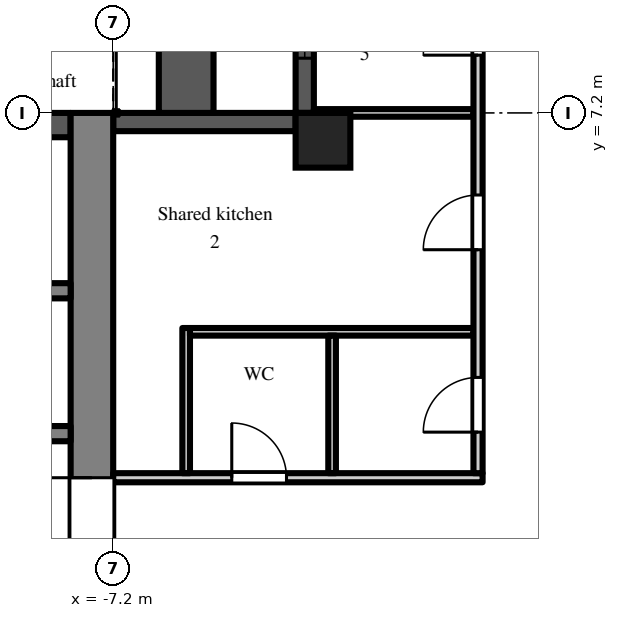
"""IFC4 building model, lengths in metres.
Left out: names, types, materials, properties, quantities, classifications, styles, units other than length and angle.
Written with IfcOpenShell. Run it as: python <this file> out.ifc"""

import sys

from ifc_helpers import new_model, si_unit, direction, frame, frame_2d, origin, origin_2d, place, context, subcontext, project, spatial, rectangle, extrude, element, fill, save


model = new_model("IFC4")
c1 = context("Model", 3, precision=1e-05, world=origin(), true_north=direction((0.0, 1.0)))
c2 = subcontext(c1, "Body", "Model", "MODEL_VIEW")
j1 = project(units=[si_unit("LENGTHUNIT", "METRE"), si_unit("PLANEANGLEUNIT", "RADIAN")], contexts=[c1])
p1 = place(None, origin())
s1 = spatial("IfcSite", under=j1, at=p1, CompositionType="ELEMENT")
p2 = place(p1, origin())
s2 = spatial("IfcBuilding", under=s1, at=p2, CompositionType="ELEMENT")
p3 = place(p2, frame((0.0, 0.0, 231.9)))
s3 = spatial("IfcBuildingStorey", under=s2, at=p3, CompositionType="ELEMENT", Elevation=231.9)
p4 = place(p3, frame((-3.75, 6.75, 0.0), z_axis=(0.0, 0.0, 1.0), x_axis=(1.0, 0.0, 0.0)))
e1 = element("IfcColumn", 1, at=p4, inside=s3, PredefinedType="COLUMN", context=c2, shape_type="SweptSolid", body=[
    extrude(rectangle(XDim=0.9, YDim=0.9, at=origin_2d()), origin(), (0.0, 0.0, 1.0), 3.0),
])
p5 = place(p3, frame((-4.05, 14.4, 0.0), z_axis=(0.0, 0.0, 1.0), x_axis=(0.0, -1.0, 0.0)))
e2 = element("IfcWall", 2, at=p5, inside=s3, PredefinedType="SOLIDWALL", context=c2, shape_type="SweptSolid", body=[
    extrude(rectangle(XDim=7.2, YDim=0.3, at=frame_2d((3.6, 0.0))), origin(), (0.0, 0.0, 1.0), 2.3),
])
p6 = place(p5, frame((3.0, 0.0, 0.0)))
e3 = element("IfcOpeningElement", 3, at=p6, cuts=e2, PredefinedType="OPENING", context=c2, shape_type="SweptSolid", body=[
    extrude(rectangle(XDim=1.2, YDim=2.05, at=frame_2d((0.6, 1.025))), frame((0.0, 0.16, 0.0), z_axis=(0.0, -1.0, 0.0), x_axis=(1.0, 0.0, 0.0)), (0.0, 0.0, 1.0), 0.32),
])
p7 = place(p5, frame((0.9, 0.0, 0.2)))
e4 = element("IfcOpeningElement", 4, at=p7, cuts=e2, PredefinedType="OPENING", context=c2, shape_type="SweptSolid", body=[
    extrude(rectangle(XDim=1.8, YDim=1.85, at=frame_2d((0.9, 0.925))), frame((0.0, 0.16, 0.0), z_axis=(0.0, -1.0, 0.0), x_axis=(1.0, 0.0, 0.0)), (0.0, 0.0, 1.0), 0.32),
])
p8 = place(p5, frame((4.5, 0.0, 0.2)))
e5 = element("IfcOpeningElement", 5, at=p8, cuts=e2, PredefinedType="OPENING", context=c2, shape_type="SweptSolid", body=[
    extrude(rectangle(XDim=1.8, YDim=1.85, at=frame_2d((0.9, 0.925))), frame((0.0, 0.16, 0.0), z_axis=(0.0, -1.0, 0.0), x_axis=(1.0, 0.0, 0.0)), (0.0, 0.0, 1.0), 0.32),
])
p9 = place(p3, frame((-4.2, 7.05, 0.0), z_axis=(0.0, 0.0, 1.0), x_axis=(-1.0, 0.0, 0.0)))
e6 = element("IfcWall", 6, at=p9, inside=s3, PredefinedType="SOLIDWALL", context=c2, shape_type="SweptSolid", body=[
    extrude(rectangle(XDim=3.0, YDim=0.3, at=frame_2d((1.5, 0.0))), origin(), (0.0, 0.0, 1.0), 2.3),
])
p10 = place(p3, frame((-6.0, 7.2, 0.0), z_axis=(0.0, 0.0, 1.0), x_axis=(0.0, 1.0, 0.0)))
e7 = element("IfcWall", 7, at=p10, inside=s3, PredefinedType="PARAPET", context=c2, shape_type="SweptSolid", body=[
    extrude(rectangle(XDim=7.2, YDim=0.9, at=frame_2d((3.6, 0.0))), origin(), (0.0, 0.0, 1.0), 0.8),
])
p11 = place(p3, frame((-7.55, -7.2, 0.0), z_axis=(0.0, 0.0, 1.0), x_axis=(0.0, 1.0, 0.0)))
e8 = element("IfcWall", 8, at=p11, inside=s3, PredefinedType="SHEAR", context=c2, shape_type="SweptSolid", body=[
    extrude(rectangle(XDim=14.4, YDim=0.7, at=frame_2d((7.2, 0.0))), origin(), (0.0, 0.0, 1.0), 2.6),
])
p12 = place(p11, frame((6.0, 0.0, 0.0)))
e9 = element("IfcOpeningElement", 9, at=p12, cuts=e8, PredefinedType="OPENING", context=c2, shape_type="SweptSolid", body=[
    extrude(rectangle(XDim=2.4, YDim=2.2, at=frame_2d((1.2, 1.1))), frame((0.0, 0.36, 0.0), z_axis=(0.0, -1.0, 0.0), x_axis=(1.0, 0.0, 0.0)), (0.0, 0.0, 1.0), 0.72),
])
p13 = place(p3, frame((-7.9, 7.0, 0.0), z_axis=(0.0, 0.0, 1.0), x_axis=(-1.0, 0.0, 0.0)))
e10 = element("IfcWall", 10, at=p13, inside=s3, PredefinedType="SHEAR", context=c2, shape_type="SweptSolid", body=[
    extrude(rectangle(XDim=12.95, YDim=0.4, at=frame_2d((6.475, 0.0))), origin(), (0.0, 0.0, 1.0), 2.6),
])
p14 = place(p3, frame((-7.9, 1.925, 0.0), z_axis=(0.0, 0.0, 1.0), x_axis=(-1.0, 0.0, 0.0)))
e11 = element("IfcWall", 11, at=p14, inside=s3, PredefinedType="SHEAR", context=c2, shape_type="SweptSolid", body=[
    extrude(rectangle(XDim=12.95, YDim=0.25, at=frame_2d((6.475, 0.0))), origin(), (0.0, 0.0, 1.0), 2.6),
])
p15 = place(p14, frame((4.825, 0.0, 0.0)))
e12 = element("IfcOpeningElement", 12, at=p15, cuts=e11, PredefinedType="OPENING", context=c2, shape_type="SweptSolid", body=[
    extrude(rectangle(XDim=1.1, YDim=2.1, at=frame_2d((0.55, 1.05))), frame((0.0, 0.135, 0.0), z_axis=(0.0, -1.0, 0.0), x_axis=(1.0, 0.0, 0.0)), (0.0, 0.0, 1.0), 0.27),
])
p16 = place(p14, frame((7.025, 0.0, 0.0)))
e13 = element("IfcOpeningElement", 13, at=p16, cuts=e11, PredefinedType="OPENING", context=c2, shape_type="SweptSolid", body=[
    extrude(rectangle(XDim=1.1, YDim=2.1, at=frame_2d((0.55, 1.05))), frame((0.0, 0.135, 0.0), z_axis=(0.0, -1.0, 0.0), x_axis=(1.0, 0.0, 0.0)), (0.0, 0.0, 1.0), 0.27),
])
p17 = place(p14, frame((9.225, 0.0, 0.0)))
e14 = element("IfcOpeningElement", 14, at=p17, cuts=e11, PredefinedType="OPENING", context=c2, shape_type="SweptSolid", body=[
    extrude(rectangle(XDim=1.1, YDim=2.1, at=frame_2d((0.55, 1.05))), frame((0.0, 0.135, 0.0), z_axis=(0.0, -1.0, 0.0), x_axis=(1.0, 0.0, 0.0)), (0.0, 0.0, 1.0), 0.27),
])
p18 = place(p14, frame((0.525, 0.0, 0.0)))
e15 = element("IfcOpeningElement", 15, at=p18, cuts=e11, PredefinedType="OPENING", context=c2, shape_type="SweptSolid", body=[
    extrude(rectangle(XDim=0.9, YDim=2.1, at=frame_2d((0.45, 1.05))), frame((0.0, 0.135, 0.0), z_axis=(0.0, -1.0, 0.0), x_axis=(1.0, 0.0, 0.0)), (0.0, 0.0, 1.0), 0.27),
])
p19 = place(p14, frame((2.625, 0.0, 0.0)))
e16 = element("IfcOpeningElement", 16, at=p19, cuts=e11, PredefinedType="OPENING", context=c2, shape_type="SweptSolid", body=[
    extrude(rectangle(XDim=1.1, YDim=2.1, at=frame_2d((0.55, 1.05))), frame((0.0, 0.135, 0.0), z_axis=(0.0, -1.0, 0.0), x_axis=(1.0, 0.0, 0.0)), (0.0, 0.0, 1.0), 0.27),
])
p20 = place(p14, frame((11.525, 0.0, 0.0)))
e17 = element("IfcOpeningElement", 17, at=p20, cuts=e11, PredefinedType="OPENING", context=c2, shape_type="SweptSolid", body=[
    extrude(rectangle(XDim=0.9, YDim=2.1, at=frame_2d((0.45, 1.05))), frame((0.0, 0.135, 0.0), z_axis=(0.0, -1.0, 0.0), x_axis=(1.0, 0.0, 0.0)), (0.0, 0.0, 1.0), 0.27),
])
p21 = place(p3, frame((-7.9, 4.275, 0.0), z_axis=(0.0, 0.0, 1.0), x_axis=(-1.0, 0.0, 0.0)))
e18 = element("IfcWall", 18, at=p21, inside=s3, PredefinedType="SHEAR", context=c2, shape_type="SweptSolid", body=[
    extrude(rectangle(XDim=1.95, YDim=0.25, at=frame_2d((0.975, 0.0))), origin(), (0.0, 0.0, 1.0), 2.6),
])
p22 = place(p3, frame((-7.2, 1.2, 0.0), z_axis=(0.0, 0.0, 1.0), x_axis=(1.0, 0.0, 0.0)))
e19 = element("IfcWall", 19, at=p22, inside=s3, PredefinedType="PARTITIONING", context=c2, shape_type="SweptSolid", body=[
    extrude(rectangle(XDim=6.075, YDim=0.15, at=frame_2d((3.038, 0.0))), origin(), (0.0, 0.0, 1.0), 2.6),
])
p23 = place(p22, frame((1.95, 0.0, 0.0)))
e20 = element("IfcOpeningElement", 20, at=p23, cuts=e19, PredefinedType="OPENING", context=c2, shape_type="SweptSolid", body=[
    extrude(rectangle(XDim=0.9, YDim=2.1, at=frame_2d((0.45, 1.05))), frame((0.0, 0.085, 0.0), z_axis=(0.0, -1.0, 0.0), x_axis=(1.0, 0.0, 0.0)), (0.0, 0.0, 1.0), 0.17),
])
p24 = place(p3, frame((-6.0, 1.275, 0.0), z_axis=(0.0, 0.0, 1.0), x_axis=(0.0, 1.0, 0.0)))
e21 = element("IfcWall", 21, at=p24, inside=s3, PredefinedType="PARTITIONING", context=c2, shape_type="SweptSolid", body=[
    extrude(rectangle(XDim=2.388, YDim=0.125, at=frame_2d((1.194, 0.0))), origin(), (0.0, 0.0, 1.0), 2.6),
])
p25 = place(p3, frame((-5.938, 3.6, 0.0), z_axis=(0.0, 0.0, 1.0), x_axis=(1.0, 0.0, 0.0)))
e22 = element("IfcWall", 22, at=p25, inside=s3, PredefinedType="PARTITIONING", context=c2, shape_type="SweptSolid", body=[
    extrude(rectangle(XDim=4.663, YDim=0.125, at=frame_2d((2.331, 0.0))), origin(), (0.0, 0.0, 1.0), 2.6),
])
p26 = place(p3, frame((-3.9, 7.2, 0.0), z_axis=(0.0, 0.0, 1.0), x_axis=(1.0, 0.0, 0.0)))
e23 = element("IfcWall", 23, at=p26, inside=s3, PredefinedType="PARTITIONING", context=c2, shape_type="SweptSolid", body=[
    extrude(rectangle(XDim=2.625, YDim=0.125, at=frame_2d((1.312, 0.0))), origin(), (0.0, 0.0, 1.0), 2.6),
])
p27 = place(p3, frame((-3.6, 1.275, 0.0), z_axis=(0.0, 0.0, 1.0), x_axis=(0.0, 1.0, 0.0)))
e24 = element("IfcWall", 24, at=p27, inside=s3, PredefinedType="PARTITIONING", context=c2, shape_type="SweptSolid", body=[
    extrude(rectangle(XDim=2.263, YDim=0.125, at=frame_2d((1.131, 0.0))), origin(), (0.0, 0.0, 1.0), 2.6),
])
p28 = place(p3, frame((-1.2, 1.275, 0.0), z_axis=(0.0, 0.0, 1.0), x_axis=(0.0, 1.0, 0.0)))
e25 = element("IfcWall", 25, at=p28, inside=s3, PredefinedType="PARTITIONING", context=c2, shape_type="SweptSolid", body=[
    extrude(rectangle(XDim=18.25, YDim=0.15, at=frame_2d((9.125, 0.0))), origin(), (0.0, 0.0, 1.0), 2.6),
])
p29 = place(p28, frame((0.675, 0.0, 0.0)))
e26 = element("IfcOpeningElement", 26, at=p29, cuts=e25, PredefinedType="OPENING", context=c2, shape_type="SweptSolid", body=[
    extrude(rectangle(XDim=0.9, YDim=2.1, at=frame_2d((0.45, 1.05))), frame((0.0, 0.085, 0.0), z_axis=(0.0, -1.0, 0.0), x_axis=(1.0, 0.0, 0.0)), (0.0, 0.0, 1.0), 0.17),
])
p30 = place(p28, frame((3.675, 0.0, 0.0)))
e27 = element("IfcOpeningElement", 27, at=p30, cuts=e25, PredefinedType="OPENING", context=c2, shape_type="SweptSolid", body=[
    extrude(rectangle(XDim=0.9, YDim=2.1, at=frame_2d((0.45, 1.05))), frame((0.0, 0.085, 0.0), z_axis=(0.0, -1.0, 0.0), x_axis=(1.0, 0.0, 0.0)), (0.0, 0.0, 1.0), 0.17),
])
p31 = place(p28, frame((6.875, 0.0, 0.0)))
e28 = element("IfcOpeningElement", 28, at=p31, cuts=e25, PredefinedType="OPENING", context=c2, shape_type="SweptSolid", body=[
    extrude(rectangle(XDim=0.9, YDim=2.1, at=frame_2d((0.45, 1.05))), frame((0.0, 0.085, 0.0), z_axis=(0.0, -1.0, 0.0), x_axis=(1.0, 0.0, 0.0)), (0.0, 0.0, 1.0), 0.17),
])
p32 = place(p28, frame((10.475, 0.0, 0.0)))
e29 = element("IfcOpeningElement", 29, at=p32, cuts=e25, PredefinedType="OPENING", context=c2, shape_type="SweptSolid", body=[
    extrude(rectangle(XDim=0.9, YDim=2.1, at=frame_2d((0.45, 1.05))), frame((0.0, 0.085, 0.0), z_axis=(0.0, -1.0, 0.0), x_axis=(1.0, 0.0, 0.0)), (0.0, 0.0, 1.0), 0.17),
])
p33 = place(p28, frame((13.725, 0.0, 0.0)))
e30 = element("IfcOpeningElement", 30, at=p33, cuts=e25, PredefinedType="OPENING", context=c2, shape_type="SweptSolid", body=[
    extrude(rectangle(XDim=1.0, YDim=2.1, at=frame_2d((0.5, 1.05))), frame((0.0, 0.085, 0.0), z_axis=(0.0, -1.0, 0.0), x_axis=(1.0, 0.0, 0.0)), (0.0, 0.0, 1.0), 0.17),
])
p34 = place(p8, origin())
e31 = element("IfcWindow", 31, at=p34, inside=s3, PartitioningType="SINGLE_PANEL", PredefinedType="WINDOW", context=c2, shape_type="SweptSolid", body=[
    extrude(rectangle(XDim=1.8, YDim=1.85, at=frame_2d((0.9, 0.925))), frame((0.0, 0.03, 0.0), z_axis=(0.0, -1.0, 0.0), x_axis=(1.0, 0.0, 0.0)), (0.0, 0.0, 1.0), 0.06),
])
fill(e5, e31)
p35 = place(p12, origin())
e32 = element("IfcDoor", 32, at=p35, inside=s3, OperationType="DOUBLE_DOOR_DOUBLE_SWING", PredefinedType="DOOR", context=c2, shape_type="SweptSolid", body=[
    extrude(rectangle(XDim=2.4, YDim=2.2, at=frame_2d((1.2, 1.1))), frame((0.0, 0.025, 0.0), z_axis=(0.0, -1.0, 0.0), x_axis=(1.0, 0.0, 0.0)), (0.0, 0.0, 1.0), 0.05),
])
fill(e9, e32)
p36 = place(p29, origin())
e33 = element("IfcDoor", 33, at=p36, inside=s3, OperationType="SINGLE_SWING_LEFT", PredefinedType="DOOR", context=c2, shape_type="SweptSolid", body=[
    extrude(rectangle(XDim=0.9, YDim=2.1, at=frame_2d((0.45, 1.05))), frame((0.0, 0.025, 0.0), z_axis=(0.0, -1.0, 0.0), x_axis=(1.0, 0.0, 0.0)), (0.0, 0.0, 1.0), 0.05),
])
fill(e26, e33)
p37 = place(p23, origin())
e34 = element("IfcDoor", 34, at=p37, inside=s3, OperationType="SINGLE_SWING_LEFT", PredefinedType="DOOR", context=c2, shape_type="SweptSolid", body=[
    extrude(rectangle(XDim=0.9, YDim=2.1, at=frame_2d((0.45, 1.05))), frame((0.0, 0.025, 0.0), z_axis=(0.0, -1.0, 0.0), x_axis=(1.0, 0.0, 0.0)), (0.0, 0.0, 1.0), 0.05),
])
fill(e20, e34)
p38 = place(p30, origin())
e35 = element("IfcDoor", 35, at=p38, inside=s3, OperationType="SINGLE_SWING_LEFT", PredefinedType="DOOR", context=c2, shape_type="SweptSolid", body=[
    extrude(rectangle(XDim=0.9, YDim=2.1, at=frame_2d((0.45, 1.05))), frame((0.0, 0.025, 0.0), z_axis=(0.0, -1.0, 0.0), x_axis=(1.0, 0.0, 0.0)), (0.0, 0.0, 1.0), 0.05),
])
fill(e27, e35)
p39 = place(p31, origin())
e36 = element("IfcDoor", 36, at=p39, inside=s3, OperationType="SINGLE_SWING_LEFT", PredefinedType="DOOR", context=c2, shape_type="SweptSolid", body=[
    extrude(rectangle(XDim=0.9, YDim=2.1, at=frame_2d((0.45, 1.05))), frame((0.0, 0.025, 0.0), z_axis=(0.0, -1.0, 0.0), x_axis=(1.0, 0.0, 0.0)), (0.0, 0.0, 1.0), 0.05),
])
fill(e28, e36)
save(model, sys.argv[1])
